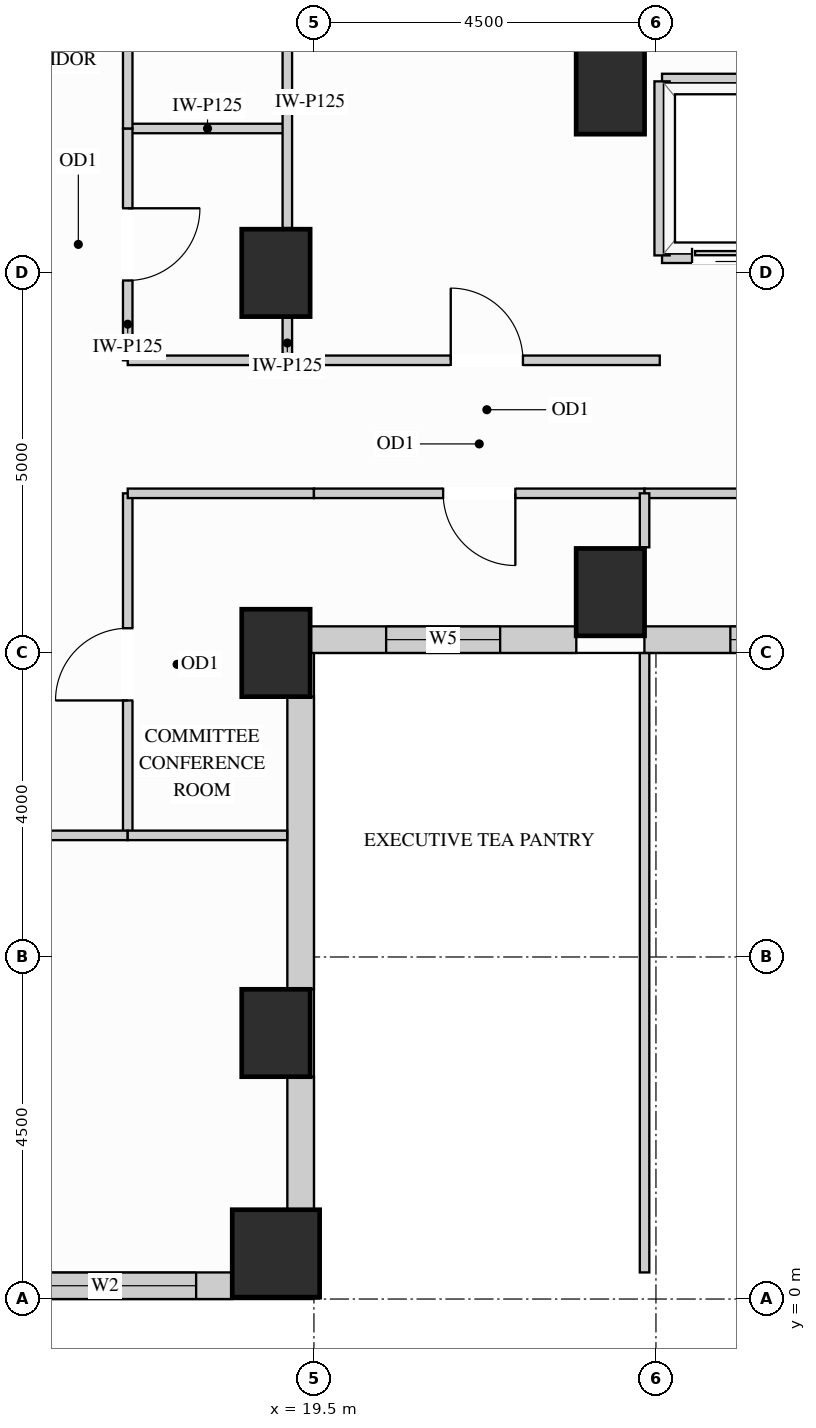
"""IFC4 building model, lengths in metres.
Left out: names, types, materials, properties, quantities, classifications, styles, units other than length and angle.
Written with IfcOpenShell. Run it as: python <this file> out.ifc"""

import sys

from ifc_helpers import new_model, si_unit, direction, frame, frame_2d, origin, origin_2d, place, context, subcontext, project, spatial, rectangle, extrude, source, transform, mapped, element, fill, save


model = new_model("IFC4")
c1 = context("Model", 3, precision=1e-05, world=origin(), true_north=direction((0.0, 1.0)))
c2 = subcontext(c1, "Body", "Model", "MODEL_VIEW")
j1 = project(units=[si_unit("LENGTHUNIT", "METRE"), si_unit("PLANEANGLEUNIT", "RADIAN")], contexts=[c1])
p1 = place(None, origin())
s1 = spatial("IfcSite", under=j1, at=p1, CompositionType="ELEMENT")
p2 = place(p1, origin())
s2 = spatial("IfcBuilding", under=s1, at=p2, CompositionType="ELEMENT")
p3 = place(p2, frame((0.0, 0.0, 88.2)))
s3 = spatial("IfcBuildingStorey", under=s2, at=p3, CompositionType="ELEMENT", Elevation=88.2)
m1 = source(origin(), c2, "Body", "SweptSolid", [
    extrude(rectangle(XDim=0.9, YDim=1.15, at=origin_2d()), origin(), (0.0, 0.0, 1.0), 3.38),
])
for number, where, z_axis, x_axis in (
    (1, (19.0, 13.5, 0.0), (0.0, 0.0, 1.0), (1.0, 0.0, 0.0)),
    (2, (19.0, 3.5, 0.0), (0.0, 0.0, 1.0), (1.0, 0.0, 0.0)),
    (3, (19.0, 8.5, 0.0), (0.0, 0.0, 1.0), (1.0, 0.0, 0.0)),
    (4, (23.4, 15.9, 0.0), (0.0, 0.0, 1.0), (1.0, 0.0, 0.0)),
    (5, (23.4, 9.3, 0.0), (0.0, 0.0, 1.0), (1.0, 0.0, 0.0)),
):
    element("IfcColumn", number, at=place(p3, frame(where, z_axis=z_axis, x_axis=x_axis)), inside=s3, PredefinedType="COLUMN", context=c2, shape_type="MappedRepresentation", body=[
        mapped(m1, transform((0.0, 0.0, 0.0), x_axis=(1.0, 0.0, 0.0), y_axis=(0.0, 1.0, 0.0), z_axis=(0.0, 0.0, 1.0))),
    ])
m2 = source(origin(), c2, "Body", "SweptSolid", [
    extrude(rectangle(XDim=1.15, YDim=1.15, at=origin_2d()), origin(), (0.0, 0.0, 1.0), 3.38),
])
p4 = place(p3, frame((19.0, 0.6, 0.0), z_axis=(0.0, 0.0, 1.0), x_axis=(1.0, 0.0, 0.0)))
e6 = element("IfcColumn", 6, at=p4, inside=s3, PredefinedType="COLUMN", context=c2, shape_type="MappedRepresentation", body=[
    mapped(m2, transform((0.0, 0.0, 0.0), x_axis=(1.0, 0.0, 0.0), y_axis=(0.0, 1.0, 0.0), z_axis=(0.0, 0.0, 1.0))),
])
p5 = place(p3, frame((15.073, 0.175, 0.0), z_axis=(0.0, 0.0, 1.0), x_axis=(1.0, 0.0, 0.0)))
e7 = element("IfcWall", 7, at=p5, inside=s3, PredefinedType="SOLIDWALL", context=c2, shape_type="SweptSolid", body=[
    extrude(rectangle(XDim=3.354, YDim=0.35, at=frame_2d((1.677, 0.0))), origin(), (0.0, 0.0, 1.0), 3.365),
])
p6 = place(p5, frame((0.477, 0.0, 0.78)))
e8 = element("IfcOpeningElement", 8, at=p6, cuts=e7, PredefinedType="OPENING", context=c2, shape_type="SweptSolid", body=[
    extrude(rectangle(XDim=2.4, YDim=2.1, at=frame_2d((1.2, 1.05))), frame((0.0, 0.185, 0.0), z_axis=(0.0, -1.0, 0.0), x_axis=(1.0, 0.0, 0.0)), (0.0, 0.0, 1.0), 0.37),
])
m3 = source(origin(), c2, "Body", "SweptSolid", [
    extrude(rectangle(XDim=1.754, YDim=0.35, at=frame_2d((0.877, 0.0))), origin(), (0.0, 0.0, 1.0), 2.519),
])
p7 = place(p3, frame((19.325, 1.173, 0.0), z_axis=(0.0, 0.0, 1.0), x_axis=(0.0, 1.0, 0.0)))
e9 = element("IfcWall", 9, at=p7, inside=s3, PredefinedType="SOLIDWALL", context=c2, shape_type="MappedRepresentation", body=[
    mapped(m3, transform((0.0, 0.0, 0.0), x_axis=(1.0, 0.0, 0.0), y_axis=(0.0, 1.0, 0.0), z_axis=(0.0, 0.0, 1.0))),
])
m4 = source(origin(), c2, "Body", "SweptSolid", [
    extrude(rectangle(XDim=3.854, YDim=0.35, at=frame_2d((1.927, 0.0))), origin(), (0.0, 0.0, 1.0), 2.519),
])
p8 = place(p3, frame((19.325, 4.073, 0.0), z_axis=(0.0, 0.0, 1.0), x_axis=(0.0, 1.0, 0.0)))
e10 = element("IfcWall", 10, at=p8, inside=s3, PredefinedType="SOLIDWALL", context=c2, shape_type="MappedRepresentation", body=[
    mapped(m4, transform((0.0, 0.0, 0.0), x_axis=(1.0, 0.0, 0.0), y_axis=(0.0, 1.0, 0.0), z_axis=(0.0, 0.0, 1.0))),
])
p9 = place(p3, frame((19.448, 8.675, 0.0), z_axis=(0.0, 0.0, 1.0), x_axis=(1.0, 0.0, 0.0)))
e11 = element("IfcWall", 11, at=p9, inside=s3, PredefinedType="SOLIDWALL", context=c2, shape_type="SweptSolid", body=[
    extrude(rectangle(XDim=3.504, YDim=0.35, at=frame_2d((1.752, 0.0))), origin(), (0.0, 0.0, 1.0), 3.365),
])
p10 = place(p9, frame((1.002, 0.0, 0.78)))
e12 = element("IfcOpeningElement", 12, at=p10, cuts=e11, PredefinedType="OPENING", context=c2, shape_type="SweptSolid", body=[
    extrude(rectangle(XDim=1.5, YDim=2.0, at=frame_2d((0.75, 1.0))), frame((0.0, 0.185, 0.0), z_axis=(0.0, -1.0, 0.0), x_axis=(1.0, 0.0, 0.0)), (0.0, 0.0, 1.0), 0.37),
])
p11 = place(p3, frame((23.848, 8.675, 0.0), z_axis=(0.0, 0.0, 1.0), x_axis=(1.0, 0.0, 0.0)))
e13 = element("IfcWall", 13, at=p11, inside=s3, PredefinedType="SOLIDWALL", context=c2, shape_type="SweptSolid", body=[
    extrude(rectangle(XDim=6.204, YDim=0.35, at=frame_2d((3.102, 0.0))), origin(), (0.0, 0.0, 1.0), 3.365),
])
p12 = place(p11, frame((1.131, 0.0, 0.78)))
e14 = element("IfcOpeningElement", 14, at=p12, cuts=e13, PredefinedType="OPENING", context=c2, shape_type="SweptSolid", body=[
    extrude(rectangle(XDim=1.5, YDim=2.0, at=frame_2d((0.75, 1.0))), frame((0.0, 0.185, 0.0), z_axis=(0.0, -1.0, 0.0), x_axis=(1.0, 0.0, 0.0)), (0.0, 0.0, 1.0), 0.37),
])
p13 = place(p11, frame((3.441, 0.0, 0.78)))
e15 = element("IfcOpeningElement", 15, at=p13, cuts=e13, PredefinedType="OPENING", context=c2, shape_type="SweptSolid", body=[
    extrude(rectangle(XDim=1.5, YDim=2.0, at=frame_2d((0.75, 1.0))), frame((0.0, 0.185, 0.0), z_axis=(0.0, -1.0, 0.0), x_axis=(1.0, 0.0, 0.0)), (0.0, 0.0, 1.0), 0.37),
])
m5 = source(origin(), c2, "Body", "SweptSolid", [
    extrude(rectangle(XDim=2.1, YDim=0.125, at=frame_2d((1.05, 0.0))), origin(), (0.0, 0.0, 1.0), 3.365),
])
p14 = place(p3, frame((17.05, 15.4, 0.0), z_axis=(0.0, 0.0, 1.0), x_axis=(1.0, 0.0, 0.0)))
e16 = element("IfcWall", 16, at=p14, inside=s3, PredefinedType="PARTITIONING", context=c2, shape_type="MappedRepresentation", body=[
    mapped(m5, transform((0.0, 0.0, 0.0), x_axis=(1.0, 0.0, 0.0), y_axis=(0.0, 1.0, 0.0), z_axis=(0.0, 0.0, 1.0))),
])
m6 = source(origin(), c2, "Body", "SweptSolid", [
    extrude(rectangle(XDim=0.56, YDim=0.125, at=frame_2d((0.28, 0.0))), origin(), (0.0, 0.0, 1.0), 2.677),
])
p15 = place(p3, frame((19.15, 12.35, 0.0), z_axis=(0.0, 0.0, 1.0), x_axis=(0.0, 1.0, 0.0)))
e17 = element("IfcWall", 17, at=p15, inside=s3, PredefinedType="PARTITIONING", context=c2, shape_type="MappedRepresentation", body=[
    mapped(m6, transform((0.0, 0.0, 0.0), x_axis=(1.0, 0.0, 0.0), y_axis=(0.0, 1.0, 0.0), z_axis=(0.0, 0.0, 1.0))),
])
m7 = source(origin(), c2, "Body", "SweptSolid", [
    extrude(rectangle(XDim=3.32, YDim=0.125, at=frame_2d((1.66, 0.0))), origin(), (0.0, 0.0, 1.0), 2.677),
])
p16 = place(p3, frame((19.15, 14.09, 0.0), z_axis=(0.0, 0.0, 1.0), x_axis=(0.0, 1.0, 0.0)))
e18 = element("IfcWall", 18, at=p16, inside=s3, PredefinedType="PARTITIONING", context=c2, shape_type="MappedRepresentation", body=[
    mapped(m7, transform((0.0, 0.0, 0.0), x_axis=(1.0, 0.0, 0.0), y_axis=(0.0, 1.0, 0.0), z_axis=(0.0, 0.0, 1.0))),
])
p17 = place(p3, frame((17.05, 12.35, 0.0), z_axis=(0.0, 0.0, 1.0), x_axis=(0.0, 1.0, 0.0)))
e19 = element("IfcWall", 19, at=p17, inside=s3, PredefinedType="PARTITIONING", context=c2, shape_type="SweptSolid", body=[
    extrude(rectangle(XDim=3.05, YDim=0.125, at=frame_2d((1.525, 0.0))), origin(), (0.0, 0.0, 1.0), 3.365),
])
p18 = place(p17, frame((1.05, 0.0, 0.0)))
e20 = element("IfcOpeningElement", 20, at=p18, cuts=e19, PredefinedType="OPENING", context=c2, shape_type="SweptSolid", body=[
    extrude(rectangle(XDim=0.95, YDim=2.15, at=frame_2d((0.475, 1.075))), frame((0.0, 0.073, 0.0), z_axis=(0.0, -1.0, 0.0), x_axis=(1.0, 0.0, 0.0)), (0.0, 0.0, 1.0), 0.145),
])
p19 = place(p3, frame((17.05, 15.4, 0.0), z_axis=(0.0, 0.0, 1.0), x_axis=(0.0, 1.0, 0.0)))
e21 = element("IfcWall", 21, at=p19, inside=s3, PredefinedType="PARTITIONING", context=c2, shape_type="SweptSolid", body=[
    extrude(rectangle(XDim=7.95, YDim=0.125, at=frame_2d((3.975, 0.0))), origin(), (0.0, 0.0, 1.0), 3.365),
])
p20 = place(p19, frame((3.5, 0.0, 0.0)))
e22 = element("IfcOpeningElement", 22, at=p20, cuts=e21, PredefinedType="OPENING", context=c2, shape_type="SweptSolid", body=[
    extrude(rectangle(XDim=0.95, YDim=2.15, at=frame_2d((0.475, 1.075))), frame((0.0, 0.073, 0.0), z_axis=(0.0, -1.0, 0.0), x_axis=(1.0, 0.0, 0.0)), (0.0, 0.0, 1.0), 0.145),
])
p21 = place(p3, frame((17.05, 6.1, 0.0), z_axis=(0.0, 0.0, 1.0), x_axis=(0.0, 1.0, 0.0)))
e23 = element("IfcWall", 23, at=p21, inside=s3, PredefinedType="PARTITIONING", context=c2, shape_type="SweptSolid", body=[
    extrude(rectangle(XDim=4.5, YDim=0.125, at=frame_2d((2.25, 0.0))), origin(), (0.0, 0.0, 1.0), 3.365),
])
p22 = place(p21, frame((1.775, 0.0, 0.0)))
e24 = element("IfcOpeningElement", 24, at=p22, cuts=e23, PredefinedType="OPENING", context=c2, shape_type="SweptSolid", body=[
    extrude(rectangle(XDim=0.95, YDim=2.15, at=frame_2d((0.475, 1.075))), frame((0.0, 0.073, 0.0), z_axis=(0.0, -1.0, 0.0), x_axis=(1.0, 0.0, 0.0)), (0.0, 0.0, 1.0), 0.145),
])
m8 = source(origin(), c2, "Body", "SweptSolid", [
    extrude(rectangle(XDim=2.45, YDim=0.125, at=frame_2d((1.225, 0.0))), origin(), (0.0, 0.0, 1.0), 3.365),
])
p23 = place(p3, frame((17.05, 12.35, 0.0), z_axis=(0.0, 0.0, 1.0), x_axis=(1.0, 0.0, 0.0)))
e25 = element("IfcWall", 25, at=p23, inside=s3, PredefinedType="PARTITIONING", context=c2, shape_type="MappedRepresentation", body=[
    mapped(m8, transform((0.0, 0.0, 0.0), x_axis=(1.0, 0.0, 0.0), y_axis=(0.0, 1.0, 0.0), z_axis=(0.0, 0.0, 1.0))),
])
p24 = place(p3, frame((19.5, 12.35, 0.0), z_axis=(0.0, 0.0, 1.0), x_axis=(1.0, 0.0, 0.0)))
e26 = element("IfcWall", 26, at=p24, inside=s3, PredefinedType="PARTITIONING", context=c2, shape_type="SweptSolid", body=[
    extrude(rectangle(XDim=4.55, YDim=0.125, at=frame_2d((2.275, 0.0))), origin(), (0.0, 0.0, 1.0), 3.365),
])
p25 = place(p24, frame((1.8, 0.0, 0.0)))
e27 = element("IfcOpeningElement", 27, at=p25, cuts=e26, PredefinedType="OPENING", context=c2, shape_type="SweptSolid", body=[
    extrude(rectangle(XDim=0.95, YDim=2.15, at=frame_2d((0.475, 1.075))), frame((0.0, 0.073, 0.0), z_axis=(0.0, -1.0, 0.0), x_axis=(1.0, 0.0, 0.0)), (0.0, 0.0, 1.0), 0.145),
])
p26 = place(p3, frame((17.05, 10.6, 0.0), z_axis=(0.0, 0.0, 1.0), x_axis=(1.0, 0.0, 0.0)))
e28 = element("IfcWall", 28, at=p26, inside=s3, PredefinedType="PARTITIONING", context=c2, shape_type="MappedRepresentation", body=[
    mapped(m8, transform((0.0, 0.0, 0.0), x_axis=(1.0, 0.0, 0.0), y_axis=(0.0, 1.0, 0.0), z_axis=(0.0, 0.0, 1.0))),
])
p27 = place(p3, frame((19.5, 10.6, 0.0), z_axis=(0.0, 0.0, 1.0), x_axis=(1.0, 0.0, 0.0)))
e29 = element("IfcWall", 29, at=p27, inside=s3, PredefinedType="PARTITIONING", context=c2, shape_type="SweptSolid", body=[
    extrude(rectangle(XDim=4.35, YDim=0.125, at=frame_2d((2.175, 0.0))), origin(), (0.0, 0.0, 1.0), 3.365),
])
p28 = place(p27, frame((1.7, 0.0, 0.0)))
e30 = element("IfcOpeningElement", 30, at=p28, cuts=e29, PredefinedType="OPENING", context=c2, shape_type="SweptSolid", body=[
    extrude(rectangle(XDim=0.95, YDim=2.15, at=frame_2d((0.475, 1.075))), frame((0.0, 0.073, 0.0), z_axis=(0.0, -1.0, 0.0), x_axis=(1.0, 0.0, 0.0)), (0.0, 0.0, 1.0), 0.145),
])
p29 = place(p3, frame((23.85, 10.6, 0.0), z_axis=(0.0, 0.0, 1.0), x_axis=(1.0, 0.0, 0.0)))
e31 = element("IfcWall", 31, at=p29, inside=s3, PredefinedType="PARTITIONING", context=c2, shape_type="SweptSolid", body=[
    extrude(rectangle(XDim=6.0, YDim=0.125, at=frame_2d((3.0, 0.0))), origin(), (0.0, 0.0, 1.0), 3.365),
])
p30 = place(p29, frame((2.525, 0.0, 0.0)))
e32 = element("IfcOpeningElement", 32, at=p30, cuts=e31, PredefinedType="OPENING", context=c2, shape_type="SweptSolid", body=[
    extrude(rectangle(XDim=0.95, YDim=2.15, at=frame_2d((0.475, 1.075))), frame((0.0, 0.073, 0.0), z_axis=(0.0, -1.0, 0.0), x_axis=(1.0, 0.0, 0.0)), (0.0, 0.0, 1.0), 0.145),
])
m9 = source(origin(), c2, "Body", "SweptSolid", [
    extrude(rectangle(XDim=8.148, YDim=0.125, at=frame_2d((4.074, 0.0))), origin(), (0.0, 0.0, 1.0), 3.365),
])
p31 = place(p3, frame((23.85, 0.35, 0.0), z_axis=(0.0, 0.0, 1.0), x_axis=(0.0, 1.0, 0.0)))
e33 = element("IfcWall", 33, at=p31, inside=s3, PredefinedType="PARTITIONING", context=c2, shape_type="MappedRepresentation", body=[
    mapped(m9, transform((0.0, 0.0, 0.0), x_axis=(1.0, 0.0, 0.0), y_axis=(0.0, 1.0, 0.0), z_axis=(0.0, 0.0, 1.0))),
])
m10 = source(origin(), c2, "Body", "SweptSolid", [
    extrude(rectangle(XDim=0.71, YDim=0.125, at=frame_2d((0.355, 0.0))), origin(), (0.0, 0.0, 1.0), 3.365),
])
p32 = place(p3, frame((23.85, 9.89, 0.0), z_axis=(0.0, 0.0, 1.0), x_axis=(0.0, 1.0, 0.0)))
e34 = element("IfcWall", 34, at=p32, inside=s3, PredefinedType="PARTITIONING", context=c2, shape_type="MappedRepresentation", body=[
    mapped(m10, transform((0.0, 0.0, 0.0), x_axis=(1.0, 0.0, 0.0), y_axis=(0.0, 1.0, 0.0), z_axis=(0.0, 0.0, 1.0))),
])
p33 = place(p3, frame((9.551, 6.1, 0.0), z_axis=(0.0, 0.0, 1.0), x_axis=(1.0, 0.0, 0.0)))
e35 = element("IfcWall", 35, at=p33, inside=s3, PredefinedType="PARTITIONING", context=c2, shape_type="SweptSolid", body=[
    extrude(rectangle(XDim=7.499, YDim=0.125, at=frame_2d((3.75, 0.0))), origin(), (0.0, 0.0, 1.0), 3.365),
])
p34 = place(p33, frame((3.274, 0.0, 0.0)))
e36 = element("IfcOpeningElement", 36, at=p34, cuts=e35, PredefinedType="OPENING", context=c2, shape_type="SweptSolid", body=[
    extrude(rectangle(XDim=0.95, YDim=2.15, at=frame_2d((0.475, 1.075))), frame((0.0, 0.073, 0.0), z_axis=(0.0, -1.0, 0.0), x_axis=(1.0, 0.0, 0.0)), (0.0, 0.0, 1.0), 0.145),
])
m11 = source(origin(), c2, "Body", "SweptSolid", [
    extrude(rectangle(XDim=2.098, YDim=0.125, at=frame_2d((1.049, 0.0))), origin(), (0.0, 0.0, 1.0), 3.365),
])
p35 = place(p3, frame((17.05, 6.1, 0.0), z_axis=(0.0, 0.0, 1.0), x_axis=(1.0, 0.0, 0.0)))
e37 = element("IfcWall", 37, at=p35, inside=s3, PredefinedType="PARTITIONING", context=c2, shape_type="MappedRepresentation", body=[
    mapped(m11, transform((0.0, 0.0, 0.0), x_axis=(1.0, 0.0, 0.0), y_axis=(0.0, 1.0, 0.0), z_axis=(0.0, 0.0, 1.0))),
])
m12 = source(origin(), c2, "Body", "SweptSolid", [
    extrude(rectangle(XDim=1.89, YDim=0.2, at=frame_2d((0.945, 0.0))), origin(), (0.0, 0.0, 1.0), 2.677),
])
p36 = place(p3, frame((24.08, 16.02, 0.0), z_axis=(0.0, 0.0, 1.0), x_axis=(1.0, 0.0, 0.0)))
e38 = element("IfcWall", 38, at=p36, inside=s3, PredefinedType="PARTITIONING", context=c2, shape_type="MappedRepresentation", body=[
    mapped(m12, transform((0.0, 0.0, 0.0), x_axis=(1.0, 0.0, 0.0), y_axis=(0.0, 1.0, 0.0), z_axis=(0.0, 0.0, 1.0))),
])
p37 = place(p3, frame((24.08, 13.73, 0.0), z_axis=(0.0, 0.0, 1.0), x_axis=(1.0, 0.0, 0.0)))
e39 = element("IfcWall", 39, at=p37, inside=s3, PredefinedType="PARTITIONING", context=c2, shape_type="SweptSolid", body=[
    extrude(rectangle(XDim=1.89, YDim=0.2, at=frame_2d((0.945, 0.0))), origin(), (0.0, 0.0, 1.0), 2.446),
])
p38 = place(p37, frame((0.395, 0.0, 0.0)))
e40 = element("IfcOpeningElement", 40, at=p38, cuts=e39, PredefinedType="OPENING", context=c2, shape_type="SweptSolid", body=[
    extrude(rectangle(XDim=1.1, YDim=2.2, at=frame_2d((0.55, 1.1))), frame((0.0, 0.11, 0.0), z_axis=(0.0, -1.0, 0.0), x_axis=(1.0, 0.0, 0.0)), (0.0, 0.0, 1.0), 0.22),
])
m13 = source(origin(), c2, "Body", "SweptSolid", [
    extrude(rectangle(XDim=2.29, YDim=0.2, at=frame_2d((1.145, 0.0))), origin(), (0.0, 0.0, 1.0), 3.365),
])
p39 = place(p3, frame((24.08, 13.73, 0.0), z_axis=(0.0, 0.0, 1.0), x_axis=(0.0, 1.0, 0.0)))
e41 = element("IfcWall", 41, at=p39, inside=s3, PredefinedType="PARTITIONING", context=c2, shape_type="MappedRepresentation", body=[
    mapped(m13, transform((0.0, 0.0, 0.0), x_axis=(1.0, 0.0, 0.0), y_axis=(0.0, 1.0, 0.0), z_axis=(0.0, 0.0, 1.0))),
])
m14 = source(origin(), c2, "Body", "SweptSolid", [
    extrude(rectangle(XDim=1.1, YDim=2.2, at=frame_2d((0.55, 1.1))), frame((0.0, 0.025, 0.0), z_axis=(0.0, -1.0, 0.0), x_axis=(1.0, 0.0, 0.0)), (0.0, 0.0, 1.0), 0.05),
])
p40 = place(p38, origin())
e42 = element("IfcDoor", 42, at=p40, inside=s3, OperationType="SLIDING_TO_LEFT", PredefinedType="DOOR", context=c2, shape_type="MappedRepresentation", body=[
    mapped(m14, transform((0.0, 0.0, 0.0), x_axis=(1.0, 0.0, 0.0), y_axis=(0.0, 1.0, 0.0), z_axis=(0.0, 0.0, 1.0))),
])
fill(e40, e42)
m15 = source(origin(), c2, "Body", "SweptSolid", [
    extrude(rectangle(XDim=0.95, YDim=2.15, at=frame_2d((0.475, 1.075))), frame((0.0, 0.025, 0.0), z_axis=(0.0, -1.0, 0.0), x_axis=(1.0, 0.0, 0.0)), (0.0, 0.0, 1.0), 0.05),
])
p41 = place(p22, origin())
e43 = element("IfcDoor", 43, at=p41, inside=s3, OperationType="SINGLE_SWING_LEFT", PredefinedType="DOOR", context=c2, shape_type="MappedRepresentation", body=[
    mapped(m15, transform((0.0, 0.0, 0.0), x_axis=(1.0, 0.0, 0.0), y_axis=(0.0, 1.0, 0.0), z_axis=(0.0, 0.0, 1.0))),
])
fill(e24, e43)
p42 = place(p18, origin())
e44 = element("IfcDoor", 44, at=p42, inside=s3, OperationType="SINGLE_SWING_RIGHT", PredefinedType="DOOR", context=c2, shape_type="MappedRepresentation", body=[
    mapped(m15, transform((0.0, 0.0, 0.0), x_axis=(1.0, 0.0, 0.0), y_axis=(0.0, 1.0, 0.0), z_axis=(0.0, 0.0, 1.0))),
])
fill(e20, e44)
p43 = place(p25, origin())
e45 = element("IfcDoor", 45, at=p43, inside=s3, OperationType="SINGLE_SWING_LEFT", PredefinedType="DOOR", context=c2, shape_type="MappedRepresentation", body=[
    mapped(m15, transform((0.0, 0.0, 0.0), x_axis=(1.0, 0.0, 0.0), y_axis=(0.0, 1.0, 0.0), z_axis=(0.0, 0.0, 1.0))),
])
fill(e27, e45)
p44 = place(p28, origin())
e46 = element("IfcDoor", 46, at=p44, inside=s3, OperationType="SINGLE_SWING_RIGHT", PredefinedType="DOOR", context=c2, shape_type="MappedRepresentation", body=[
    mapped(m15, transform((0.0, 0.0, 0.0), x_axis=(1.0, 0.0, 0.0), y_axis=(0.0, 1.0, 0.0), z_axis=(0.0, 0.0, 1.0))),
])
fill(e30, e46)
m16 = source(origin(), c2, "Body", "SweptSolid", [
    extrude(rectangle(XDim=2.4, YDim=2.1, at=frame_2d((1.2, 1.05))), frame((0.0, 0.03, 0.0), z_axis=(0.0, -1.0, 0.0), x_axis=(1.0, 0.0, 0.0)), (0.0, 0.0, 1.0), 0.06),
])
p45 = place(p6, origin())
e47 = element("IfcWindow", 47, at=p45, inside=s3, PartitioningType="SINGLE_PANEL", PredefinedType="WINDOW", context=c2, shape_type="MappedRepresentation", body=[
    mapped(m16, transform((0.0, 0.0, 0.0), x_axis=(1.0, 0.0, 0.0), y_axis=(0.0, 1.0, 0.0), z_axis=(0.0, 0.0, 1.0))),
])
fill(e8, e47)
m17 = source(origin(), c2, "Body", "SweptSolid", [
    extrude(rectangle(XDim=1.5, YDim=2.0, at=frame_2d((0.75, 1.0))), frame((0.0, 0.03, 0.0), z_axis=(0.0, -1.0, 0.0), x_axis=(1.0, 0.0, 0.0)), (0.0, 0.0, 1.0), 0.06),
])
p46 = place(p10, origin())
e48 = element("IfcWindow", 48, at=p46, inside=s3, PartitioningType="SINGLE_PANEL", PredefinedType="WINDOW", context=c2, shape_type="MappedRepresentation", body=[
    mapped(m17, transform((0.0, 0.0, 0.0), x_axis=(1.0, 0.0, 0.0), y_axis=(0.0, 1.0, 0.0), z_axis=(0.0, 0.0, 1.0))),
])
fill(e12, e48)
p47 = place(p12, origin())
e49 = element("IfcWindow", 49, at=p47, inside=s3, PartitioningType="SINGLE_PANEL", PredefinedType="WINDOW", context=c2, shape_type="MappedRepresentation", body=[
    mapped(m17, transform((0.0, 0.0, 0.0), x_axis=(1.0, 0.0, 0.0), y_axis=(0.0, 1.0, 0.0), z_axis=(0.0, 0.0, 1.0))),
])
fill(e14, e49)
save(model, sys.argv[1])
